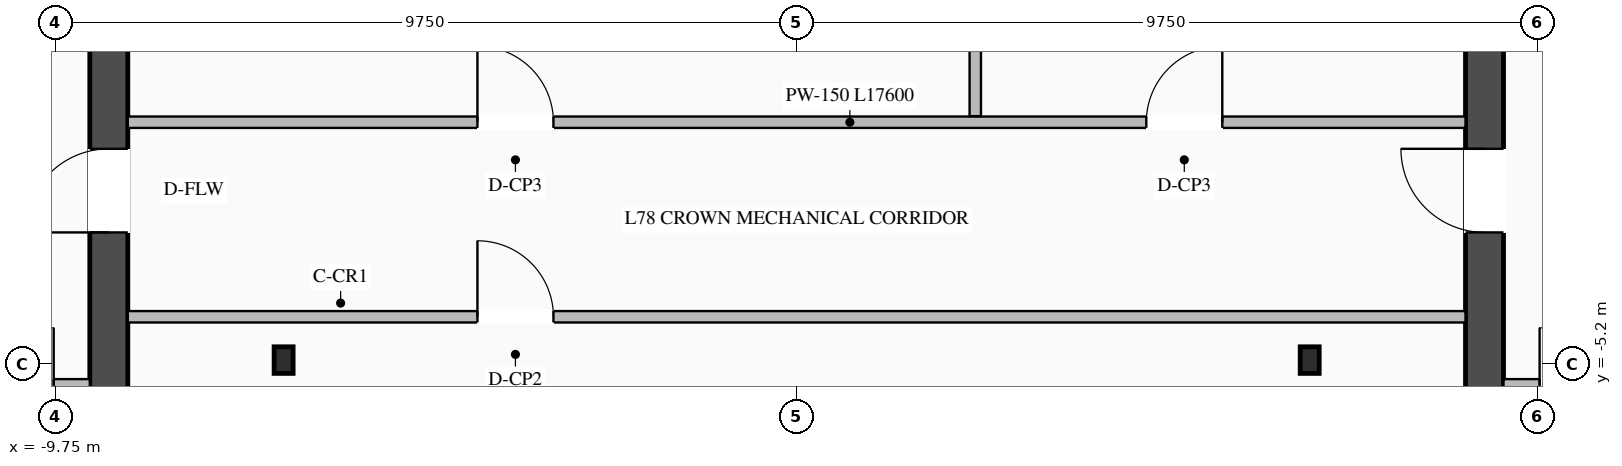
"""IFC4 building model, lengths in metres.
Left out: names, types, materials, properties, quantities, classifications, styles, units other than length and angle.
Written with IfcOpenShell. Run it as: python <this file> out.ifc"""

import sys

from ifc_helpers import new_model, si_unit, direction, frame, frame_2d, origin, origin_2d, place, context, subcontext, project, spatial, rectangle, i_section, extrude, element, fill, save


model = new_model("IFC4")
c1 = context("Model", 3, precision=1e-05, world=origin(), true_north=direction((0.0, 1.0)))
c2 = subcontext(c1, "Body", "Model", "MODEL_VIEW")
j1 = project(units=[si_unit("LENGTHUNIT", "METRE"), si_unit("PLANEANGLEUNIT", "RADIAN")], contexts=[c1])
p1 = place(None, origin())
s1 = spatial("IfcSite", under=j1, at=p1, CompositionType="ELEMENT")
p2 = place(p1, origin())
s2 = spatial("IfcBuilding", under=s1, at=p2, CompositionType="ELEMENT")
p3 = place(p2, frame((0.0, 0.0, 286.95)))
s3 = spatial("IfcBuildingStorey", under=s2, at=p3, CompositionType="ELEMENT", Elevation=286.95)
p4 = place(p3, frame((-9.05, -8.55, 0.0), z_axis=(0.0, 0.0, 1.0), x_axis=(0.0, 1.0, 0.0)))
e1 = element("IfcWall", 1, at=p4, inside=s3, PredefinedType="SHEAR", context=c2, shape_type="SweptSolid", body=[
    extrude(rectangle(XDim=17.1, YDim=0.5, at=frame_2d((8.55, 0.0))), origin(), (0.0, 0.0, 1.0), 3.35),
])
p5 = place(p4, frame((5.08, 0.0, 0.0)))
e2 = element("IfcOpeningElement", 2, at=p5, cuts=e1, PredefinedType="OPENING", context=c2, shape_type="SweptSolid", body=[
    extrude(rectangle(XDim=1.1, YDim=2.08, at=frame_2d((0.55, 1.04))), frame((0.0, 0.26, 0.0), z_axis=(0.0, -1.0, 0.0), x_axis=(1.0, 0.0, 0.0)), (0.0, 0.0, 1.0), 0.52),
])
p6 = place(p3, frame((9.05, -8.55, 0.0), z_axis=(0.0, 0.0, 1.0), x_axis=(0.0, 1.0, 0.0)))
e3 = element("IfcWall", 3, at=p6, inside=s3, PredefinedType="SHEAR", context=c2, shape_type="SweptSolid", body=[
    extrude(rectangle(XDim=17.1, YDim=0.5, at=frame_2d((8.55, 0.0))), origin(), (0.0, 0.0, 1.0), 3.35),
])
p7 = place(p6, frame((5.08, 0.0, 0.0)))
e4 = element("IfcOpeningElement", 4, at=p7, cuts=e3, PredefinedType="OPENING", context=c2, shape_type="SweptSolid", body=[
    extrude(rectangle(XDim=1.1, YDim=2.08, at=frame_2d((0.55, 1.04))), frame((0.0, 0.26, 0.0), z_axis=(0.0, -1.0, 0.0), x_axis=(1.0, 0.0, 0.0)), (0.0, 0.0, 1.0), 0.52),
])
for number, where, z_axis, x_axis in (
    (5, (-6.75, -5.15, 0.0), (0.0, 0.0, 1.0), (1.0, 0.0, 0.0)),
    (6, (6.75, -5.15, 0.0), (0.0, 0.0, 1.0), (1.0, 0.0, 0.0)),
):
    element("IfcColumn", number, at=place(p3, frame(where, z_axis=z_axis, x_axis=x_axis)), inside=s3, PredefinedType="COLUMN", context=c2, shape_type="SweptSolid", body=[
        extrude(i_section(OverallWidth=0.25, OverallDepth=0.35, WebThickness=0.01, FlangeThickness=0.012, at=origin_2d()), origin(), (0.0, 0.0, 1.0), 3.6),
    ])
p8 = place(p3, frame((-12.895, -5.475, 0.0), z_axis=(0.0, 0.0, 1.0), x_axis=(1.0, 0.0, 0.0)))
e7 = element("IfcWall", 7, at=p8, inside=s3, PredefinedType="STANDARD", context=c2, shape_type="SweptSolid", body=[
    extrude(rectangle(XDim=3.595, YDim=0.15, at=frame_2d((1.797, 0.0))), origin(), (0.0, 0.0, 1.0), 3.33),
])
p9 = place(p8, frame((0.42, 0.0, 0.0)))
e8 = element("IfcOpeningElement", 8, at=p9, cuts=e7, PredefinedType="OPENING", context=c2, shape_type="SweptSolid", body=[
    extrude(rectangle(XDim=1.1, YDim=2.15, at=frame_2d((0.55, 1.075))), frame((0.0, 0.085, 0.0), z_axis=(0.0, -1.0, 0.0), x_axis=(1.0, 0.0, 0.0)), (0.0, 0.0, 1.0), 0.17),
])
p10 = place(p8, frame((2.37, 0.0, 0.0)))
e9 = element("IfcOpeningElement", 9, at=p10, cuts=e7, PredefinedType="OPENING", context=c2, shape_type="SweptSolid", body=[
    extrude(rectangle(XDim=0.75, YDim=2.05, at=frame_2d((0.375, 1.025))), frame((0.0, 0.085, 0.0), z_axis=(0.0, -1.0, 0.0), x_axis=(1.0, 0.0, 0.0)), (0.0, 0.0, 1.0), 0.17),
])
p11 = place(p3, frame((9.3, -5.475, 0.0), z_axis=(0.0, 0.0, 1.0), x_axis=(1.0, 0.0, 0.0)))
e10 = element("IfcWall", 10, at=p11, inside=s3, PredefinedType="STANDARD", context=c2, shape_type="SweptSolid", body=[
    extrude(rectangle(XDim=3.595, YDim=0.15, at=frame_2d((1.797, 0.0))), origin(), (0.0, 0.0, 1.0), 3.33),
])
p12 = place(p11, frame((2.075, 0.0, 0.0)))
e11 = element("IfcOpeningElement", 11, at=p12, cuts=e10, PredefinedType="OPENING", context=c2, shape_type="SweptSolid", body=[
    extrude(rectangle(XDim=1.1, YDim=2.15, at=frame_2d((0.55, 1.075))), frame((0.0, 0.085, 0.0), z_axis=(0.0, -1.0, 0.0), x_axis=(1.0, 0.0, 0.0)), (0.0, 0.0, 1.0), 0.17),
])
p13 = place(p11, frame((0.475, 0.0, 0.0)))
e12 = element("IfcOpeningElement", 12, at=p13, cuts=e10, PredefinedType="OPENING", context=c2, shape_type="SweptSolid", body=[
    extrude(rectangle(XDim=0.75, YDim=2.05, at=frame_2d((0.375, 1.025))), frame((0.0, 0.085, 0.0), z_axis=(0.0, -1.0, 0.0), x_axis=(1.0, 0.0, 0.0)), (0.0, 0.0, 1.0), 0.17),
])
p14 = place(p3, frame((-8.8, -2.02, 0.0), z_axis=(0.0, 0.0, 1.0), x_axis=(1.0, 0.0, 0.0)))
e13 = element("IfcWall", 13, at=p14, inside=s3, PredefinedType="STANDARD", context=c2, shape_type="SweptSolid", body=[
    extrude(rectangle(XDim=17.6, YDim=0.15, at=frame_2d((8.8, 0.0))), origin(), (0.0, 0.0, 1.0), 3.33),
])
p15 = place(p14, frame((4.6, 0.0, 0.0)))
e14 = element("IfcOpeningElement", 14, at=p15, cuts=e13, PredefinedType="OPENING", context=c2, shape_type="SweptSolid", body=[
    extrude(rectangle(XDim=1.0, YDim=2.02, at=frame_2d((0.5, 1.01))), frame((0.0, 0.085, 0.0), z_axis=(0.0, -1.0, 0.0), x_axis=(1.0, 0.0, 0.0)), (0.0, 0.0, 1.0), 0.17),
])
p16 = place(p14, frame((13.4, 0.0, 0.0)))
e15 = element("IfcOpeningElement", 15, at=p16, cuts=e13, PredefinedType="OPENING", context=c2, shape_type="SweptSolid", body=[
    extrude(rectangle(XDim=1.0, YDim=2.02, at=frame_2d((0.5, 1.01))), frame((0.0, 0.085, 0.0), z_axis=(0.0, -1.0, 0.0), x_axis=(1.0, 0.0, 0.0)), (0.0, 0.0, 1.0), 0.17),
])
p17 = place(p3, frame((2.35, -1.94, 0.0), z_axis=(0.0, 0.0, 1.0), x_axis=(0.0, 1.0, 0.0)))
e16 = element("IfcWall", 16, at=p17, inside=s3, PredefinedType="STANDARD", context=c2, shape_type="SweptSolid", body=[
    extrude(rectangle(XDim=17.469, YDim=0.15, at=frame_2d((8.735, 0.0))), origin(), (0.0, 0.0, 1.0), 3.33),
])
p18 = place(p3, frame((-8.8, -4.58, 0.0), z_axis=(0.0, 0.0, 1.0), x_axis=(1.0, 0.0, 0.0)))
e17 = element("IfcWall", 17, at=p18, inside=s3, PredefinedType="STANDARD", context=c2, shape_type="SweptSolid", body=[
    extrude(rectangle(XDim=17.6, YDim=0.15, at=frame_2d((8.8, 0.0))), origin(), (0.0, 0.0, 1.0), 3.33),
])
p19 = place(p18, frame((4.6, 0.0, 0.0)))
e18 = element("IfcOpeningElement", 18, at=p19, cuts=e17, PredefinedType="OPENING", context=c2, shape_type="SweptSolid", body=[
    extrude(rectangle(XDim=1.0, YDim=2.02, at=frame_2d((0.5, 1.01))), frame((0.0, 0.085, 0.0), z_axis=(0.0, -1.0, 0.0), x_axis=(1.0, 0.0, 0.0)), (0.0, 0.0, 1.0), 0.17),
])
p20 = place(p10, origin())
e19 = element("IfcDoor", 19, at=p20, inside=s3, OperationType="SINGLE_SWING_RIGHT", PredefinedType="DOOR", context=c2, shape_type="SweptSolid", body=[
    extrude(rectangle(XDim=0.75, YDim=2.05, at=frame_2d((0.375, 1.025))), frame((0.0, 0.025, 0.0), z_axis=(0.0, -1.0, 0.0), x_axis=(1.0, 0.0, 0.0)), (0.0, 0.0, 1.0), 0.05),
])
fill(e9, e19)
p21 = place(p5, origin())
e20 = element("IfcDoor", 20, at=p21, inside=s3, OperationType="SINGLE_SWING_LEFT", PredefinedType="DOOR", context=c2, shape_type="SweptSolid", body=[
    extrude(rectangle(XDim=1.1, YDim=2.08, at=frame_2d((0.55, 1.04))), frame((0.0, 0.205, 0.0), z_axis=(0.0, -1.0, 0.0), x_axis=(1.0, 0.0, 0.0)), (0.0, 0.0, 1.0), 0.05),
])
fill(e2, e20)
p22 = place(p13, origin())
e21 = element("IfcDoor", 21, at=p22, inside=s3, OperationType="SINGLE_SWING_LEFT", PredefinedType="DOOR", context=c2, shape_type="SweptSolid", body=[
    extrude(rectangle(XDim=0.75, YDim=2.05, at=frame_2d((0.375, 1.025))), frame((0.0, 0.025, 0.0), z_axis=(0.0, -1.0, 0.0), x_axis=(1.0, 0.0, 0.0)), (0.0, 0.0, 1.0), 0.05),
])
fill(e12, e21)
p23 = place(p7, origin())
e22 = element("IfcDoor", 22, at=p23, inside=s3, OperationType="SINGLE_SWING_RIGHT", PredefinedType="DOOR", context=c2, shape_type="SweptSolid", body=[
    extrude(rectangle(XDim=1.1, YDim=2.08, at=frame_2d((0.55, 1.04))), frame((0.0, -0.155, 0.0), z_axis=(0.0, -1.0, 0.0), x_axis=(1.0, 0.0, 0.0)), (0.0, 0.0, 1.0), 0.05),
])
fill(e4, e22)
p24 = place(p15, origin())
e23 = element("IfcDoor", 23, at=p24, inside=s3, OperationType="SINGLE_SWING_LEFT", PredefinedType="DOOR", context=c2, shape_type="SweptSolid", body=[
    extrude(rectangle(XDim=1.0, YDim=2.02, at=frame_2d((0.5, 1.01))), frame((0.0, 0.025, 0.0), z_axis=(0.0, -1.0, 0.0), x_axis=(1.0, 0.0, 0.0)), (0.0, 0.0, 1.0), 0.05),
])
fill(e14, e23)
p25 = place(p16, origin())
e24 = element("IfcDoor", 24, at=p25, inside=s3, OperationType="SINGLE_SWING_RIGHT", PredefinedType="DOOR", context=c2, shape_type="SweptSolid", body=[
    extrude(rectangle(XDim=1.0, YDim=2.02, at=frame_2d((0.5, 1.01))), frame((0.0, 0.025, 0.0), z_axis=(0.0, -1.0, 0.0), x_axis=(1.0, 0.0, 0.0)), (0.0, 0.0, 1.0), 0.05),
])
fill(e15, e24)
p26 = place(p19, origin())
e25 = element("IfcDoor", 25, at=p26, inside=s3, OperationType="SINGLE_SWING_LEFT", PredefinedType="DOOR", context=c2, shape_type="SweptSolid", body=[
    extrude(rectangle(XDim=1.0, YDim=2.02, at=frame_2d((0.5, 1.01))), frame((0.0, 0.025, 0.0), z_axis=(0.0, -1.0, 0.0), x_axis=(1.0, 0.0, 0.0)), (0.0, 0.0, 1.0), 0.05),
])
fill(e18, e25)
save(model, sys.argv[1])
